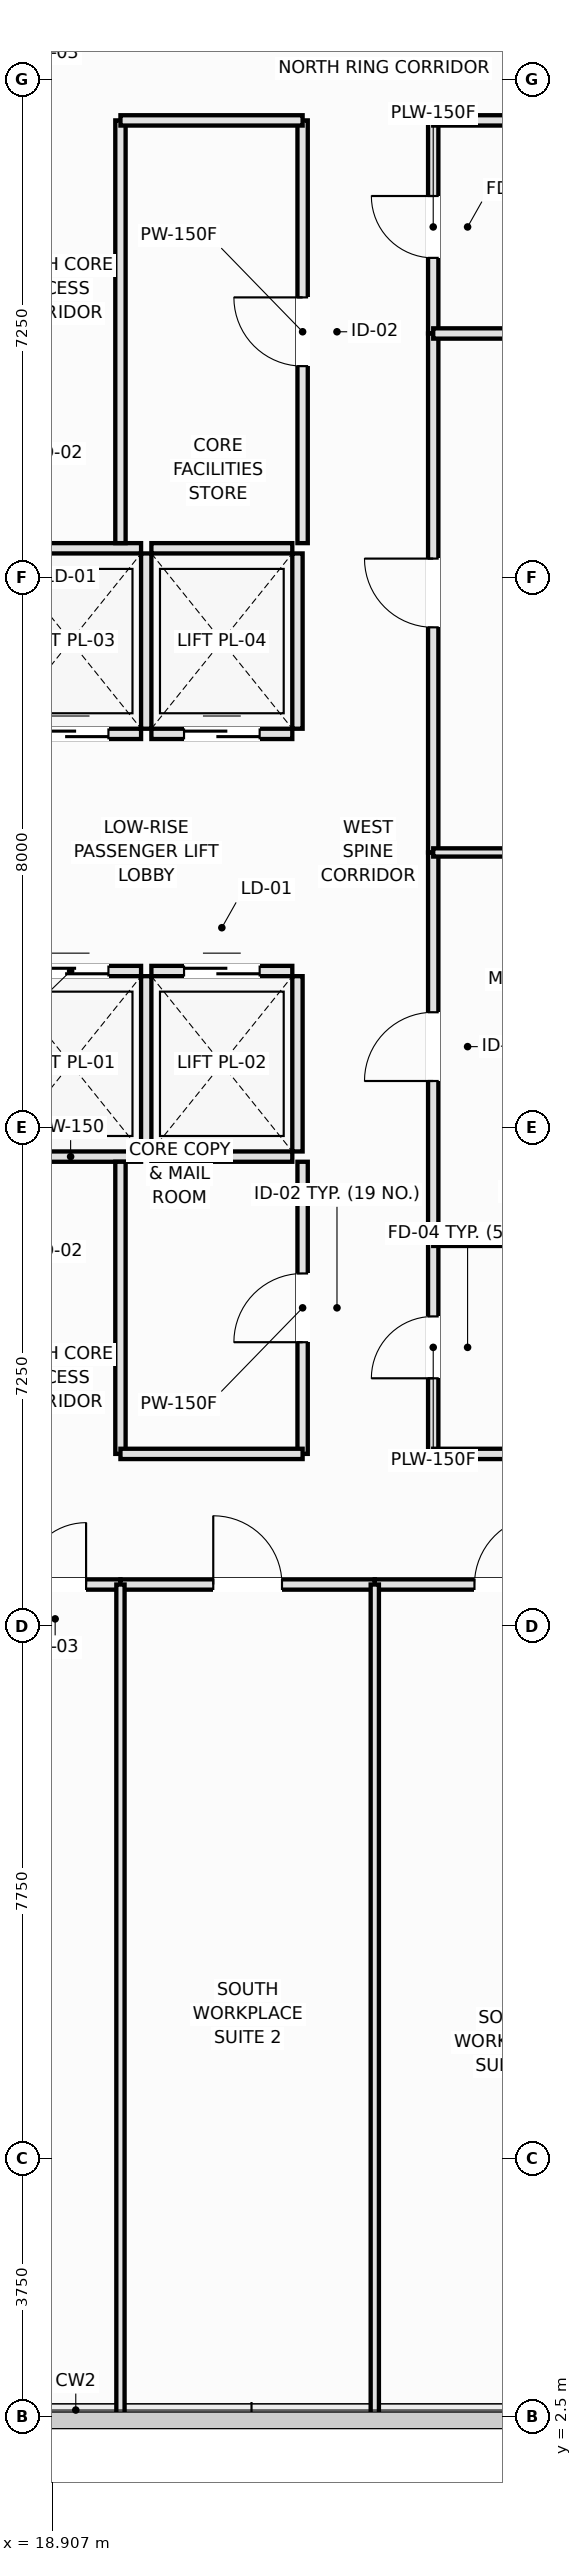
"""IFC4 building model, lengths in metres.
Left out: names, types, materials, properties, quantities, classifications, styles, units other than length and angle.
Written with IfcOpenShell. Run it as: python <this file> out.ifc"""

import sys

from ifc_helpers import new_model, si_unit, direction, frame, frame_2d, origin, place, context, subcontext, project, spatial, rectangle, extrude, element, fill, save


model = new_model("IFC4")
c1 = context("Model", 3, precision=1e-05, world=origin(), true_north=direction((0.0, 1.0)))
c2 = subcontext(c1, "Body", "Model", "MODEL_VIEW")
j1 = project(units=[si_unit("LENGTHUNIT", "METRE"), si_unit("PLANEANGLEUNIT", "RADIAN")], contexts=[c1])
p1 = place(None, origin())
s1 = spatial("IfcSite", under=j1, at=p1, CompositionType="ELEMENT")
p2 = place(p1, origin())
s2 = spatial("IfcBuilding", under=s1, at=p2, CompositionType="ELEMENT")
p3 = place(p2, frame((0.0, 0.0, 61.1)))
s3 = spatial("IfcBuildingStorey", under=s2, at=p3, CompositionType="ELEMENT", Elevation=61.1)
p4 = place(p3, frame((18.15, 20.825, 0.0), z_axis=(0.0, 0.0, 1.0), x_axis=(1.0, 0.0, 0.0)))
e1 = element("IfcWall", 1, at=p4, inside=s3, PredefinedType="PARTITIONING", context=c2, shape_type="SweptSolid", body=[
    extrude(rectangle(XDim=2.05, YDim=0.15, at=frame_2d((1.025, 0.0))), origin(), (0.0, 0.0, 1.0), 3.37),
])
p5 = place(p3, frame((18.15, 23.525, 0.0), z_axis=(0.0, 0.0, 1.0), x_axis=(1.0, 0.0, 0.0)))
e2 = element("IfcWall", 2, at=p5, inside=s3, PredefinedType="PARTITIONING", context=c2, shape_type="SweptSolid", body=[
    extrude(rectangle(XDim=2.05, YDim=0.15, at=frame_2d((1.025, 0.0))), origin(), (0.0, 0.0, 1.0), 3.37),
])
p6 = place(p5, frame((0.475, 0.0, 0.0)))
e3 = element("IfcOpeningElement", 3, at=p6, cuts=e2, PredefinedType="OPENING", context=c2, shape_type="SweptSolid", body=[
    extrude(rectangle(XDim=1.1, YDim=2.2, at=frame_2d((0.55, 1.1))), frame((0.0, 0.085, 0.0), z_axis=(0.0, -1.0, 0.0), x_axis=(1.0, 0.0, 0.0)), (0.0, 0.0, 1.0), 0.17),
])
p7 = place(p3, frame((20.275, 20.9, 0.0), z_axis=(0.0, 0.0, 1.0), x_axis=(0.0, 1.0, 0.0)))
e4 = element("IfcWall", 4, at=p7, inside=s3, PredefinedType="PARTITIONING", context=c2, shape_type="SweptSolid", body=[
    extrude(rectangle(XDim=2.55, YDim=0.15, at=frame_2d((1.275, 0.0))), origin(), (0.0, 0.0, 1.0), 3.37),
])
p8 = place(p3, frame((20.35, 20.825, 0.0), z_axis=(0.0, 0.0, 1.0), x_axis=(1.0, 0.0, 0.0)))
e5 = element("IfcWall", 5, at=p8, inside=s3, PredefinedType="PARTITIONING", context=c2, shape_type="SweptSolid", body=[
    extrude(rectangle(XDim=2.05, YDim=0.15, at=frame_2d((1.025, 0.0))), origin(), (0.0, 0.0, 1.0), 3.37),
])
p9 = place(p3, frame((20.35, 23.525, 0.0), z_axis=(0.0, 0.0, 1.0), x_axis=(1.0, 0.0, 0.0)))
e6 = element("IfcWall", 6, at=p9, inside=s3, PredefinedType="PARTITIONING", context=c2, shape_type="SweptSolid", body=[
    extrude(rectangle(XDim=2.05, YDim=0.15, at=frame_2d((1.025, 0.0))), origin(), (0.0, 0.0, 1.0), 3.37),
])
p10 = place(p9, frame((0.475, 0.0, 0.0)))
e7 = element("IfcOpeningElement", 7, at=p10, cuts=e6, PredefinedType="OPENING", context=c2, shape_type="SweptSolid", body=[
    extrude(rectangle(XDim=1.1, YDim=2.2, at=frame_2d((0.55, 1.1))), frame((0.0, 0.085, 0.0), z_axis=(0.0, -1.0, 0.0), x_axis=(1.0, 0.0, 0.0)), (0.0, 0.0, 1.0), 0.17),
])
p11 = place(p3, frame((22.475, 20.9, 0.0), z_axis=(0.0, 0.0, 1.0), x_axis=(0.0, 1.0, 0.0)))
e8 = element("IfcWall", 8, at=p11, inside=s3, PredefinedType="PARTITIONING", context=c2, shape_type="SweptSolid", body=[
    extrude(rectangle(XDim=2.55, YDim=0.15, at=frame_2d((1.275, 0.0))), origin(), (0.0, 0.0, 1.0), 3.37),
])
p12 = place(p3, frame((18.15, 26.975, 0.0), z_axis=(0.0, 0.0, 1.0), x_axis=(1.0, 0.0, 0.0)))
e9 = element("IfcWall", 9, at=p12, inside=s3, PredefinedType="PARTITIONING", context=c2, shape_type="SweptSolid", body=[
    extrude(rectangle(XDim=2.05, YDim=0.15, at=frame_2d((1.025, 0.0))), origin(), (0.0, 0.0, 1.0), 3.37),
])
p13 = place(p12, frame((0.475, 0.0, 0.0)))
e10 = element("IfcOpeningElement", 10, at=p13, cuts=e9, PredefinedType="OPENING", context=c2, shape_type="SweptSolid", body=[
    extrude(rectangle(XDim=1.1, YDim=2.2, at=frame_2d((0.55, 1.1))), frame((0.0, 0.085, 0.0), z_axis=(0.0, -1.0, 0.0), x_axis=(1.0, 0.0, 0.0)), (0.0, 0.0, 1.0), 0.17),
])
p14 = place(p3, frame((18.15, 29.675, 0.0), z_axis=(0.0, 0.0, 1.0), x_axis=(1.0, 0.0, 0.0)))
e11 = element("IfcWall", 11, at=p14, inside=s3, PredefinedType="PARTITIONING", context=c2, shape_type="SweptSolid", body=[
    extrude(rectangle(XDim=2.05, YDim=0.15, at=frame_2d((1.025, 0.0))), origin(), (0.0, 0.0, 1.0), 3.37),
])
p15 = place(p3, frame((20.275, 27.05, 0.0), z_axis=(0.0, 0.0, 1.0), x_axis=(0.0, 1.0, 0.0)))
e12 = element("IfcWall", 12, at=p15, inside=s3, PredefinedType="PARTITIONING", context=c2, shape_type="SweptSolid", body=[
    extrude(rectangle(XDim=2.55, YDim=0.15, at=frame_2d((1.275, 0.0))), origin(), (0.0, 0.0, 1.0), 3.37),
])
p16 = place(p3, frame((20.35, 26.975, 0.0), z_axis=(0.0, 0.0, 1.0), x_axis=(1.0, 0.0, 0.0)))
e13 = element("IfcWall", 13, at=p16, inside=s3, PredefinedType="PARTITIONING", context=c2, shape_type="SweptSolid", body=[
    extrude(rectangle(XDim=2.05, YDim=0.15, at=frame_2d((1.025, 0.0))), origin(), (0.0, 0.0, 1.0), 3.37),
])
p17 = place(p16, frame((0.475, 0.0, 0.0)))
e14 = element("IfcOpeningElement", 14, at=p17, cuts=e13, PredefinedType="OPENING", context=c2, shape_type="SweptSolid", body=[
    extrude(rectangle(XDim=1.1, YDim=2.2, at=frame_2d((0.55, 1.1))), frame((0.0, 0.085, 0.0), z_axis=(0.0, -1.0, 0.0), x_axis=(1.0, 0.0, 0.0)), (0.0, 0.0, 1.0), 0.17),
])
p18 = place(p3, frame((20.35, 29.675, 0.0), z_axis=(0.0, 0.0, 1.0), x_axis=(1.0, 0.0, 0.0)))
e15 = element("IfcWall", 15, at=p18, inside=s3, PredefinedType="PARTITIONING", context=c2, shape_type="SweptSolid", body=[
    extrude(rectangle(XDim=2.05, YDim=0.15, at=frame_2d((1.025, 0.0))), origin(), (0.0, 0.0, 1.0), 3.37),
])
p19 = place(p3, frame((22.475, 27.05, 0.0), z_axis=(0.0, 0.0, 1.0), x_axis=(0.0, 1.0, 0.0)))
e16 = element("IfcWall", 16, at=p19, inside=s3, PredefinedType="PARTITIONING", context=c2, shape_type="SweptSolid", body=[
    extrude(rectangle(XDim=2.55, YDim=0.15, at=frame_2d((1.275, 0.0))), origin(), (0.0, 0.0, 1.0), 3.37),
])
p20 = place(p3, frame((22.55, 16.5, 0.0), z_axis=(0.0, 0.0, 1.0), x_axis=(0.0, 1.0, 0.0)))
e17 = element("IfcWall", 17, at=p20, inside=s3, PredefinedType="PARTITIONING", context=c2, shape_type="SweptSolid", body=[
    extrude(rectangle(XDim=4.25, YDim=0.15, at=frame_2d((2.125, 0.0))), origin(), (0.0, 0.0, 1.0), 3.01),
])
p21 = place(p20, frame((1.625, 0.0, 0.0)))
e18 = element("IfcOpeningElement", 18, at=p21, cuts=e17, PredefinedType="OPENING", context=c2, shape_type="SweptSolid", body=[
    extrude(rectangle(XDim=1.0, YDim=2.15, at=frame_2d((0.5, 1.075))), frame((0.0, 0.085, 0.0), z_axis=(0.0, -1.0, 0.0), x_axis=(1.0, 0.0, 0.0)), (0.0, 0.0, 1.0), 0.17),
])
p22 = place(p3, frame((22.55, 29.75, 0.0), z_axis=(0.0, 0.0, 1.0), x_axis=(0.0, 1.0, 0.0)))
e19 = element("IfcWall", 19, at=p22, inside=s3, PredefinedType="PARTITIONING", context=c2, shape_type="SweptSolid", body=[
    extrude(rectangle(XDim=6.15, YDim=0.15, at=frame_2d((3.075, 0.0))), origin(), (0.0, 0.0, 1.0), 3.01),
])
p23 = place(p22, frame((2.575, 0.0, 0.0)))
e20 = element("IfcOpeningElement", 20, at=p23, cuts=e19, PredefinedType="OPENING", context=c2, shape_type="SweptSolid", body=[
    extrude(rectangle(XDim=1.0, YDim=2.15, at=frame_2d((0.5, 1.075))), frame((0.0, 0.085, 0.0), z_axis=(0.0, -1.0, 0.0), x_axis=(1.0, 0.0, 0.0)), (0.0, 0.0, 1.0), 0.17),
])
p24 = place(p3, frame((24.45, 16.5, 0.0), z_axis=(0.0, 0.0, 1.0), x_axis=(0.0, 1.0, 0.0)))
e21 = element("IfcWall", 21, at=p24, inside=s3, PredefinedType="PLUMBINGWALL", context=c2, shape_type="SweptSolid", body=[
    extrude(rectangle(XDim=3.1, YDim=0.15, at=frame_2d((1.55, 0.0))), origin(), (0.0, 0.0, 1.0), 3.37),
])
p25 = place(p24, frame((1.1, 0.0, 0.0)))
e22 = element("IfcOpeningElement", 22, at=p25, cuts=e21, PredefinedType="OPENING", context=c2, shape_type="SweptSolid", body=[
    extrude(rectangle(XDim=0.9, YDim=2.1, at=frame_2d((0.45, 1.05))), frame((0.0, 0.085, 0.0), z_axis=(0.0, -1.0, 0.0), x_axis=(1.0, 0.0, 0.0)), (0.0, 0.0, 1.0), 0.17),
])
p26 = place(p3, frame((24.45, 32.8, 0.0), z_axis=(0.0, 0.0, 1.0), x_axis=(0.0, 1.0, 0.0)))
e23 = element("IfcWall", 23, at=p26, inside=s3, PredefinedType="PLUMBINGWALL", context=c2, shape_type="SweptSolid", body=[
    extrude(rectangle(XDim=3.1, YDim=0.15, at=frame_2d((1.55, 0.0))), origin(), (0.0, 0.0, 1.0), 3.37),
])
p27 = place(p26, frame((1.1, 0.0, 0.0)))
e24 = element("IfcOpeningElement", 24, at=p27, cuts=e23, PredefinedType="OPENING", context=c2, shape_type="SweptSolid", body=[
    extrude(rectangle(XDim=0.9, YDim=2.1, at=frame_2d((0.45, 1.05))), frame((0.0, 0.085, 0.0), z_axis=(0.0, -1.0, 0.0), x_axis=(1.0, 0.0, 0.0)), (0.0, 0.0, 1.0), 0.17),
])
p28 = place(p3, frame((24.45, 19.6, 0.0), z_axis=(0.0, 0.0, 1.0), x_axis=(0.0, 1.0, 0.0)))
e25 = element("IfcWall", 25, at=p28, inside=s3, PredefinedType="PARTITIONING", context=c2, shape_type="SweptSolid", body=[
    extrude(rectangle(XDim=5.65, YDim=0.15, at=frame_2d((2.825, 0.0))), origin(), (0.0, 0.0, 1.0), 3.37),
])
p29 = place(p28, frame((2.325, 0.0, 0.0)))
e26 = element("IfcOpeningElement", 26, at=p29, cuts=e25, PredefinedType="OPENING", context=c2, shape_type="SweptSolid", body=[
    extrude(rectangle(XDim=1.0, YDim=2.15, at=frame_2d((0.5, 1.075))), frame((0.0, 0.085, 0.0), z_axis=(0.0, -1.0, 0.0), x_axis=(1.0, 0.0, 0.0)), (0.0, 0.0, 1.0), 0.17),
])
p30 = place(p3, frame((24.45, 25.25, 0.0), z_axis=(0.0, 0.0, 1.0), x_axis=(0.0, 1.0, 0.0)))
e27 = element("IfcWall", 27, at=p30, inside=s3, PredefinedType="PARTITIONING", context=c2, shape_type="SweptSolid", body=[
    extrude(rectangle(XDim=7.55, YDim=0.15, at=frame_2d((3.775, 0.0))), origin(), (0.0, 0.0, 1.0), 3.37),
])
p31 = place(p30, frame((3.275, 0.0, 0.0)))
e28 = element("IfcOpeningElement", 28, at=p31, cuts=e27, PredefinedType="OPENING", context=c2, shape_type="SweptSolid", body=[
    extrude(rectangle(XDim=1.0, YDim=2.15, at=frame_2d((0.5, 1.075))), frame((0.0, 0.085, 0.0), z_axis=(0.0, -1.0, 0.0), x_axis=(1.0, 0.0, 0.0)), (0.0, 0.0, 1.0), 0.17),
])
p32 = place(p3, frame((19.9, 16.5, 0.0), z_axis=(0.0, 0.0, 1.0), x_axis=(0.0, 1.0, 0.0)))
e29 = element("IfcWall", 29, at=p32, inside=s3, PredefinedType="PARTITIONING", context=c2, shape_type="SweptSolid", body=[
    extrude(rectangle(XDim=4.25, YDim=0.15, at=frame_2d((2.125, 0.0))), origin(), (0.0, 0.0, 1.0), 3.37),
])
p33 = place(p3, frame((19.9, 29.75, 0.0), z_axis=(0.0, 0.0, 1.0), x_axis=(0.0, 1.0, 0.0)))
e30 = element("IfcWall", 30, at=p33, inside=s3, PredefinedType="PARTITIONING", context=c2, shape_type="SweptSolid", body=[
    extrude(rectangle(XDim=6.15, YDim=0.15, at=frame_2d((3.075, 0.0))), origin(), (0.0, 0.0, 1.0), 3.37),
])
p34 = place(p3, frame((19.9, 16.5, 0.0), z_axis=(0.0, 0.0, 1.0), x_axis=(1.0, 0.0, 0.0)))
e31 = element("IfcWall", 31, at=p34, inside=s3, PredefinedType="PARTITIONING", context=c2, shape_type="SweptSolid", body=[
    extrude(rectangle(XDim=2.65, YDim=0.15, at=frame_2d((1.325, 0.0))), origin(), (0.0, 0.0, 1.0), 3.37),
])
p35 = place(p3, frame((24.45, 16.5, 0.0), z_axis=(0.0, 0.0, 1.0), x_axis=(1.0, 0.0, 0.0)))
e32 = element("IfcWall", 32, at=p35, inside=s3, PredefinedType="PLUMBINGWALL", context=c2, shape_type="SweptSolid", body=[
    extrude(rectangle(XDim=3.15, YDim=0.15, at=frame_2d((1.575, 0.0))), origin(), (0.0, 0.0, 1.0), 3.37),
])
p36 = place(p3, frame((18.0, 14.6, 0.0), z_axis=(0.0, 0.0, 1.0), x_axis=(1.0, 0.0, 0.0)))
e33 = element("IfcWall", 33, at=p36, inside=s3, PredefinedType="PARTITIONING", context=c2, shape_type="SweptSolid", body=[
    extrude(rectangle(XDim=1.9, YDim=0.15, at=frame_2d((0.95, 0.0))), origin(), (0.0, 0.0, 1.0), 3.37),
])
p37 = place(p36, frame((0.5, 0.0, 0.0)))
e34 = element("IfcOpeningElement", 34, at=p37, cuts=e33, PredefinedType="OPENING", context=c2, shape_type="SweptSolid", body=[
    extrude(rectangle(XDim=0.9, YDim=2.1, at=frame_2d((0.45, 1.05))), frame((0.0, 0.085, 0.0), z_axis=(0.0, -1.0, 0.0), x_axis=(1.0, 0.0, 0.0)), (0.0, 0.0, 1.0), 0.17),
])
p38 = place(p3, frame((19.9, 14.6, 0.0), z_axis=(0.0, 0.0, 1.0), x_axis=(1.0, 0.0, 0.0)))
e35 = element("IfcWall", 35, at=p38, inside=s3, PredefinedType="PARTITIONING", context=c2, shape_type="SweptSolid", body=[
    extrude(rectangle(XDim=3.7, YDim=0.15, at=frame_2d((1.85, 0.0))), origin(), (0.0, 0.0, 1.0), 3.37),
])
p39 = place(p38, frame((1.35, 0.0, 0.0)))
e36 = element("IfcOpeningElement", 36, at=p39, cuts=e35, PredefinedType="OPENING", context=c2, shape_type="SweptSolid", body=[
    extrude(rectangle(XDim=1.0, YDim=2.15, at=frame_2d((0.5, 1.075))), frame((0.0, 0.085, 0.0), z_axis=(0.0, -1.0, 0.0), x_axis=(1.0, 0.0, 0.0)), (0.0, 0.0, 1.0), 0.17),
])
p40 = place(p3, frame((23.6, 14.6, 0.0), z_axis=(0.0, 0.0, 1.0), x_axis=(1.0, 0.0, 0.0)))
e37 = element("IfcWall", 37, at=p40, inside=s3, PredefinedType="PARTITIONING", context=c2, shape_type="SweptSolid", body=[
    extrude(rectangle(XDim=3.9, YDim=0.15, at=frame_2d((1.95, 0.0))), origin(), (0.0, 0.0, 1.0), 3.37),
])
p41 = place(p40, frame((1.45, 0.0, 0.0)))
e38 = element("IfcOpeningElement", 38, at=p41, cuts=e37, PredefinedType="OPENING", context=c2, shape_type="SweptSolid", body=[
    extrude(rectangle(XDim=1.0, YDim=2.15, at=frame_2d((0.5, 1.075))), frame((0.0, 0.085, 0.0), z_axis=(0.0, -1.0, 0.0), x_axis=(1.0, 0.0, 0.0)), (0.0, 0.0, 1.0), 0.17),
])
p42 = place(p3, frame((19.9, 35.9, 0.0), z_axis=(0.0, 0.0, 1.0), x_axis=(1.0, 0.0, 0.0)))
e39 = element("IfcWall", 39, at=p42, inside=s3, PredefinedType="PARTITIONING", context=c2, shape_type="SweptSolid", body=[
    extrude(rectangle(XDim=2.65, YDim=0.15, at=frame_2d((1.325, 0.0))), origin(), (0.0, 0.0, 1.0), 3.37),
])
p43 = place(p3, frame((24.45, 35.9, 0.0), z_axis=(0.0, 0.0, 1.0), x_axis=(1.0, 0.0, 0.0)))
e40 = element("IfcWall", 40, at=p43, inside=s3, PredefinedType="PLUMBINGWALL", context=c2, shape_type="SweptSolid", body=[
    extrude(rectangle(XDim=3.15, YDim=0.15, at=frame_2d((1.575, 0.0))), origin(), (0.0, 0.0, 1.0), 3.37),
])
p44 = place(p3, frame((24.45, 19.6, 0.0), z_axis=(0.0, 0.0, 1.0), x_axis=(1.0, 0.0, 0.0)))
e41 = element("IfcWall", 41, at=p44, inside=s3, PredefinedType="PLUMBINGWALL", context=c2, shape_type="SweptSolid", body=[
    extrude(rectangle(XDim=3.05, YDim=0.15, at=frame_2d((1.525, 0.0))), origin(), (0.0, 0.0, 1.0), 3.37),
])
p45 = place(p3, frame((24.45, 32.8, 0.0), z_axis=(0.0, 0.0, 1.0), x_axis=(1.0, 0.0, 0.0)))
e42 = element("IfcWall", 42, at=p45, inside=s3, PredefinedType="PLUMBINGWALL", context=c2, shape_type="SweptSolid", body=[
    extrude(rectangle(XDim=3.15, YDim=0.15, at=frame_2d((1.575, 0.0))), origin(), (0.0, 0.0, 1.0), 3.37),
])
p46 = place(p3, frame((24.45, 25.25, 0.0), z_axis=(0.0, 0.0, 1.0), x_axis=(1.0, 0.0, 0.0)))
e43 = element("IfcWall", 43, at=p46, inside=s3, PredefinedType="PARTITIONING", context=c2, shape_type="SweptSolid", body=[
    extrude(rectangle(XDim=3.05, YDim=0.12, at=frame_2d((1.525, 0.0))), origin(), (0.0, 0.0, 1.0), 2.72),
])
for number, where, z_axis, x_axis in (
    (44, (19.9, 2.51, 0.0), (0.0, 0.0, 1.0), (0.0, 1.0, 0.0)),
    (45, (23.6, 2.51, 0.0), (0.0, 0.0, 1.0), (0.0, 1.0, 0.0)),
):
    element("IfcWall", number, at=place(p3, frame(where, z_axis=z_axis, x_axis=x_axis)), inside=s3, PredefinedType="PARTITIONING", context=c2, shape_type="SweptSolid", body=[
        extrude(rectangle(XDim=12.09, YDim=0.12, at=frame_2d((6.045, 0.0))), origin(), (0.0, 0.0, 1.0), 3.37),
    ])
p47 = place(p6, origin())
e46 = element("IfcDoor", 46, at=p47, inside=s3, OperationType="DOUBLE_DOOR_SLIDING", PredefinedType="DOOR", context=c2, shape_type="SweptSolid", body=[
    extrude(rectangle(XDim=1.1, YDim=2.2, at=frame_2d((0.55, 1.1))), frame((0.0, 0.025, 0.0), z_axis=(0.0, -1.0, 0.0), x_axis=(1.0, 0.0, 0.0)), (0.0, 0.0, 1.0), 0.05),
])
fill(e3, e46)
p48 = place(p10, origin())
e47 = element("IfcDoor", 47, at=p48, inside=s3, OperationType="DOUBLE_DOOR_SLIDING", PredefinedType="DOOR", context=c2, shape_type="SweptSolid", body=[
    extrude(rectangle(XDim=1.1, YDim=2.2, at=frame_2d((0.55, 1.1))), frame((0.0, 0.025, 0.0), z_axis=(0.0, -1.0, 0.0), x_axis=(1.0, 0.0, 0.0)), (0.0, 0.0, 1.0), 0.05),
])
fill(e7, e47)
p49 = place(p13, origin())
e48 = element("IfcDoor", 48, at=p49, inside=s3, OperationType="DOUBLE_DOOR_SLIDING", PredefinedType="DOOR", context=c2, shape_type="SweptSolid", body=[
    extrude(rectangle(XDim=1.1, YDim=2.2, at=frame_2d((0.55, 1.1))), frame((0.0, 0.025, 0.0), z_axis=(0.0, -1.0, 0.0), x_axis=(1.0, 0.0, 0.0)), (0.0, 0.0, 1.0), 0.05),
])
fill(e10, e48)
p50 = place(p17, origin())
e49 = element("IfcDoor", 49, at=p50, inside=s3, OperationType="DOUBLE_DOOR_SLIDING", PredefinedType="DOOR", context=c2, shape_type="SweptSolid", body=[
    extrude(rectangle(XDim=1.1, YDim=2.2, at=frame_2d((0.55, 1.1))), frame((0.0, 0.025, 0.0), z_axis=(0.0, -1.0, 0.0), x_axis=(1.0, 0.0, 0.0)), (0.0, 0.0, 1.0), 0.05),
])
fill(e14, e49)
p51 = place(p21, origin())
e50 = element("IfcDoor", 50, at=p51, inside=s3, OperationType="SINGLE_SWING_LEFT", PredefinedType="DOOR", context=c2, shape_type="SweptSolid", body=[
    extrude(rectangle(XDim=1.0, YDim=2.15, at=frame_2d((0.5, 1.075))), frame((0.0, 0.025, 0.0), z_axis=(0.0, -1.0, 0.0), x_axis=(1.0, 0.0, 0.0)), (0.0, 0.0, 1.0), 0.05),
])
fill(e18, e50)
p52 = place(p23, origin())
e51 = element("IfcDoor", 51, at=p52, inside=s3, OperationType="SINGLE_SWING_RIGHT", PredefinedType="DOOR", context=c2, shape_type="SweptSolid", body=[
    extrude(rectangle(XDim=1.0, YDim=2.15, at=frame_2d((0.5, 1.075))), frame((0.0, 0.025, 0.0), z_axis=(0.0, -1.0, 0.0), x_axis=(1.0, 0.0, 0.0)), (0.0, 0.0, 1.0), 0.05),
])
fill(e20, e51)
p53 = place(p25, origin())
e52 = element("IfcDoor", 52, at=p53, inside=s3, OperationType="SINGLE_SWING_LEFT", PredefinedType="DOOR", context=c2, shape_type="SweptSolid", body=[
    extrude(rectangle(XDim=0.9, YDim=2.1, at=frame_2d((0.45, 1.05))), frame((0.0, 0.025, 0.0), z_axis=(0.0, -1.0, 0.0), x_axis=(1.0, 0.0, 0.0)), (0.0, 0.0, 1.0), 0.05),
])
fill(e22, e52)
p54 = place(p27, origin())
e53 = element("IfcDoor", 53, at=p54, inside=s3, OperationType="SINGLE_SWING_RIGHT", PredefinedType="DOOR", context=c2, shape_type="SweptSolid", body=[
    extrude(rectangle(XDim=0.9, YDim=2.1, at=frame_2d((0.45, 1.05))), frame((0.0, 0.025, 0.0), z_axis=(0.0, -1.0, 0.0), x_axis=(1.0, 0.0, 0.0)), (0.0, 0.0, 1.0), 0.05),
])
fill(e24, e53)
p55 = place(p29, origin())
e54 = element("IfcDoor", 54, at=p55, inside=s3, OperationType="SINGLE_SWING_LEFT", PredefinedType="DOOR", context=c2, shape_type="SweptSolid", body=[
    extrude(rectangle(XDim=1.0, YDim=2.15, at=frame_2d((0.5, 1.075))), frame((0.0, 0.025, 0.0), z_axis=(0.0, -1.0, 0.0), x_axis=(1.0, 0.0, 0.0)), (0.0, 0.0, 1.0), 0.05),
])
fill(e26, e54)
p56 = place(p31, origin())
e55 = element("IfcDoor", 55, at=p56, inside=s3, OperationType="SINGLE_SWING_RIGHT", PredefinedType="DOOR", context=c2, shape_type="SweptSolid", body=[
    extrude(rectangle(XDim=1.0, YDim=2.15, at=frame_2d((0.5, 1.075))), frame((0.0, 0.025, 0.0), z_axis=(0.0, -1.0, 0.0), x_axis=(1.0, 0.0, 0.0)), (0.0, 0.0, 1.0), 0.05),
])
fill(e28, e55)
p57 = place(p37, origin())
e56 = element("IfcDoor", 56, at=p57, inside=s3, OperationType="SINGLE_SWING_RIGHT", PredefinedType="DOOR", context=c2, shape_type="SweptSolid", body=[
    extrude(rectangle(XDim=0.9, YDim=2.1, at=frame_2d((0.45, 1.05))), frame((0.0, 0.025, 0.0), z_axis=(0.0, -1.0, 0.0), x_axis=(1.0, 0.0, 0.0)), (0.0, 0.0, 1.0), 0.05),
])
fill(e34, e56)
p58 = place(p39, origin())
e57 = element("IfcDoor", 57, at=p58, inside=s3, OperationType="SINGLE_SWING_LEFT", PredefinedType="DOOR", context=c2, shape_type="SweptSolid", body=[
    extrude(rectangle(XDim=1.0, YDim=2.15, at=frame_2d((0.5, 1.075))), frame((0.0, 0.025, 0.0), z_axis=(0.0, -1.0, 0.0), x_axis=(1.0, 0.0, 0.0)), (0.0, 0.0, 1.0), 0.05),
])
fill(e36, e57)
p59 = place(p41, origin())
e58 = element("IfcDoor", 58, at=p59, inside=s3, OperationType="SINGLE_SWING_RIGHT", PredefinedType="DOOR", context=c2, shape_type="SweptSolid", body=[
    extrude(rectangle(XDim=1.0, YDim=2.15, at=frame_2d((0.5, 1.075))), frame((0.0, 0.025, 0.0), z_axis=(0.0, -1.0, 0.0), x_axis=(1.0, 0.0, 0.0)), (0.0, 0.0, 1.0), 0.05),
])
fill(e38, e58)
save(model, sys.argv[1])
